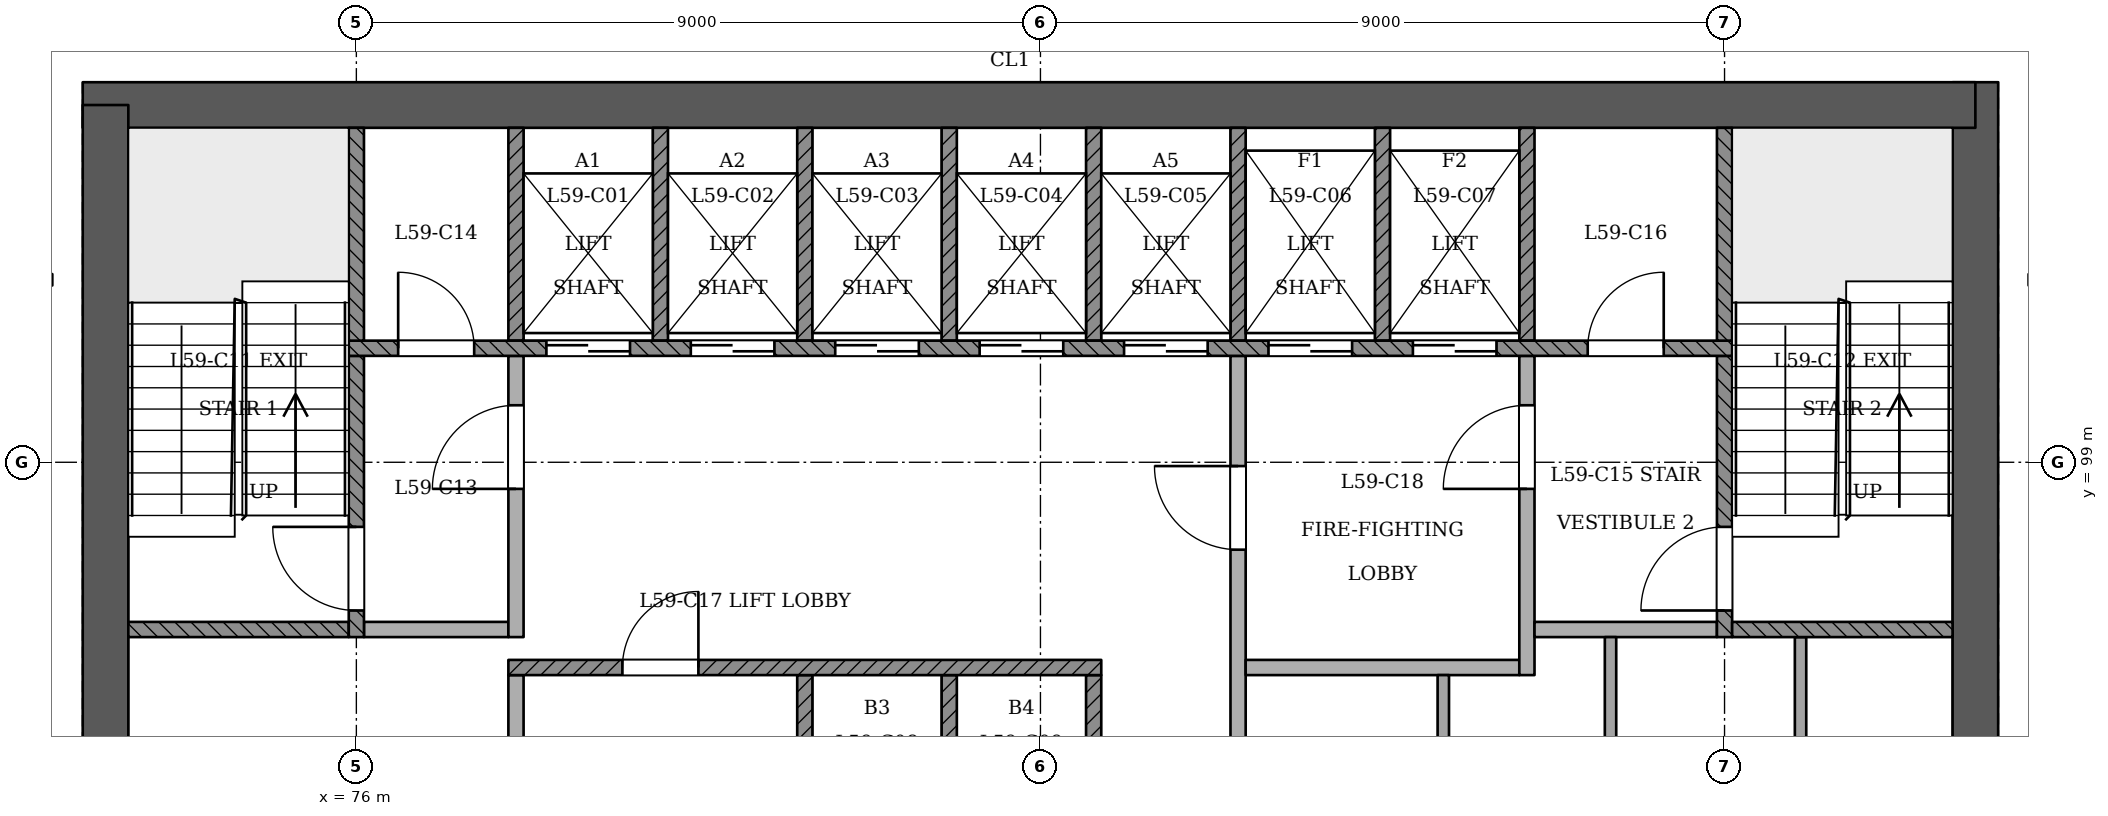
"""IFC4 building model, lengths in metres.
Left out: names, types, materials, properties, quantities, classifications, styles, units other than length and angle.
Written with IfcOpenShell. Run it as: python <this file> out.ifc"""

import sys

from ifc_helpers import new_model, si_unit, direction, frame, frame_2d, origin, place, context, subcontext, project, spatial, rectangle, extrude, element, fill, save


model = new_model("IFC4")
c1 = context("Model", 3, precision=1e-05, world=origin(), true_north=direction((0.0, 1.0)))
c2 = subcontext(c1, "Body", "Model", "MODEL_VIEW")
j1 = project(units=[si_unit("LENGTHUNIT", "METRE"), si_unit("PLANEANGLEUNIT", "RADIAN")], contexts=[c1])
p1 = place(None, origin())
s1 = spatial("IfcSite", under=j1, at=p1, CompositionType="ELEMENT")
p2 = place(p1, origin())
s2 = spatial("IfcBuilding", under=s1, at=p2, CompositionType="ELEMENT")
p3 = place(p2, frame((0.0, 0.0, 230.2)))
s3 = spatial("IfcBuildingStorey", under=s2, at=p3, CompositionType="ELEMENT", Elevation=230.2)
p4 = place(p3, frame((97.3, 93.1, 0.0), z_axis=(0.0, 0.0, 1.0), x_axis=(0.0, 1.0, 0.0)))
e1 = element("IfcWall", 1, at=p4, inside=s3, PredefinedType="SHEAR", context=c2, shape_type="SweptSolid", body=[
    extrude(rectangle(XDim=10.9, YDim=0.6, at=frame_2d((5.45, 0.0))), origin(), (0.0, 0.0, 1.0), 3.6),
])
p5 = place(p3, frame((97.3, 103.7, 0.0), z_axis=(0.0, 0.0, 1.0), x_axis=(-1.0, 0.0, 0.0)))
e2 = element("IfcWall", 2, at=p5, inside=s3, PredefinedType="SHEAR", context=c2, shape_type="SweptSolid", body=[
    extrude(rectangle(XDim=24.9, YDim=0.6, at=frame_2d((12.45, 0.0))), origin(), (0.0, 0.0, 1.0), 3.6),
])
p6 = place(p3, frame((72.7, 103.7, 0.0), z_axis=(0.0, 0.0, 1.0), x_axis=(0.0, -1.0, 0.0)))
e3 = element("IfcWall", 3, at=p6, inside=s3, PredefinedType="SHEAR", context=c2, shape_type="SweptSolid", body=[
    extrude(rectangle(XDim=10.9, YDim=0.6, at=frame_2d((5.45, 0.0))), origin(), (0.0, 0.0, 1.0), 3.6),
])
p7 = place(p3, frame((72.0, 101.401, 0.0), z_axis=(0.0, 0.0, 1.0), x_axis=(-1.0, 0.0, 0.0)))
e4 = element("IfcWall", 4, at=p7, inside=s3, PredefinedType="PARTITIONING", context=c2, shape_type="SweptSolid", body=[
    extrude(rectangle(XDim=1.8, YDim=0.15, at=frame_2d((0.9, 0.0))), origin(), (0.0, 0.0, 1.0), 3.2),
])
p8 = place(p3, frame((78.1, 93.4, 0.0), z_axis=(0.0, 0.0, 1.0), x_axis=(0.0, 1.0, 0.0)))
e5 = element("IfcWall", 5, at=p8, inside=s3, PredefinedType="PARTITIONING", context=c2, shape_type="SweptSolid", body=[
    extrude(rectangle(XDim=2.8, YDim=0.2, at=frame_2d((1.4, 0.0))), origin(), (0.0, 0.0, 1.0), 3.2),
])
for number, where, z_axis, x_axis in (
    (6, (81.9, 93.4, 0.0), (0.0, 0.0, 1.0), (0.0, 1.0, 0.0)),
    (7, (83.8, 93.4, 0.0), (0.0, 0.0, 1.0), (0.0, 1.0, 0.0)),
    (8, (85.7, 93.4, 0.0), (0.0, 0.0, 1.0), (0.0, 1.0, 0.0)),
):
    element("IfcWall", number, at=place(p3, frame(where, z_axis=z_axis, x_axis=x_axis)), inside=s3, PredefinedType="SOLIDWALL", context=c2, shape_type="SweptSolid", body=[
        extrude(rectangle(XDim=2.8, YDim=0.2, at=frame_2d((1.4, 0.0))), origin(), (0.0, 0.0, 1.0), 3.2),
    ])
p9 = place(p3, frame((87.6, 93.4, 0.0), z_axis=(0.0, 0.0, 1.0), x_axis=(0.0, 1.0, 0.0)))
e9 = element("IfcWall", 9, at=p9, inside=s3, PredefinedType="PARTITIONING", context=c2, shape_type="SweptSolid", body=[
    extrude(rectangle(XDim=7.0, YDim=0.2, at=frame_2d((3.5, 0.0))), origin(), (0.0, 0.0, 1.0), 3.2),
])
p10 = place(p9, frame((4.45, 0.0, 0.0)))
e10 = element("IfcOpeningElement", 10, at=p10, cuts=e9, PredefinedType="OPENING", context=c2, shape_type="SweptSolid", body=[
    extrude(rectangle(XDim=1.1, YDim=2.1, at=frame_2d((0.55, 1.05))), frame((0.0, 0.11, 0.0), z_axis=(0.0, -1.0, 0.0), x_axis=(1.0, 0.0, 0.0)), (0.0, 0.0, 1.0), 0.221),
])
p11 = place(p3, frame((90.3, 93.4, 0.0), z_axis=(0.0, 0.0, 1.0), x_axis=(0.0, 1.0, 0.0)))
e11 = element("IfcWall", 11, at=p11, inside=s3, PredefinedType="PARTITIONING", context=c2, shape_type="SweptSolid", body=[
    extrude(rectangle(XDim=2.8, YDim=0.15, at=frame_2d((1.4, 0.0))), origin(), (0.0, 0.0, 1.0), 3.2),
])
for number, where, z_axis, x_axis in (
    (12, (92.5, 93.4, 0.0), (0.0, 0.0, 1.0), (0.0, 1.0, 0.0)),
    (13, (95.0, 93.4, 0.0), (0.0, 0.0, 1.0), (0.0, 1.0, 0.0)),
):
    element("IfcWall", number, at=place(p3, frame(where, z_axis=z_axis, x_axis=x_axis)), inside=s3, PredefinedType="PARTITIONING", context=c2, shape_type="SweptSolid", body=[
        extrude(rectangle(XDim=3.3, YDim=0.15, at=frame_2d((1.65, 0.0))), origin(), (0.0, 0.0, 1.0), 3.2),
    ])
p12 = place(p3, frame((78.0, 96.3, 0.0), z_axis=(0.0, 0.0, 1.0), x_axis=(1.0, 0.0, 0.0)))
e14 = element("IfcWall", 14, at=p12, inside=s3, PredefinedType="SOLIDWALL", context=c2, shape_type="SweptSolid", body=[
    extrude(rectangle(XDim=7.8, YDim=0.2, at=frame_2d((3.9, 0.0))), origin(), (0.0, 0.0, 1.0), 3.2),
])
p13 = place(p12, frame((1.5, 0.0, 0.0)))
e15 = element("IfcOpeningElement", 15, at=p13, cuts=e14, PredefinedType="OPENING", context=c2, shape_type="SweptSolid", body=[
    extrude(rectangle(XDim=1.0, YDim=2.1, at=frame_2d((0.5, 1.05))), frame((0.0, 0.11, 0.0), z_axis=(0.0, -1.0, 0.0), x_axis=(1.0, 0.0, 0.0)), (0.0, 0.0, 1.0), 0.221),
])
p14 = place(p3, frame((87.7, 96.3, 0.0), z_axis=(0.0, 0.0, 1.0), x_axis=(1.0, 0.0, 0.0)))
e16 = element("IfcWall", 16, at=p14, inside=s3, PredefinedType="PARTITIONING", context=c2, shape_type="SweptSolid", body=[
    extrude(rectangle(XDim=3.6, YDim=0.2, at=frame_2d((1.8, 0.0))), origin(), (0.0, 0.0, 1.0), 3.2),
])
p15 = place(p3, frame((91.4, 96.2, 0.0), z_axis=(0.0, 0.0, 1.0), x_axis=(0.0, 1.0, 0.0)))
e17 = element("IfcWall", 17, at=p15, inside=s3, PredefinedType="PARTITIONING", context=c2, shape_type="SweptSolid", body=[
    extrude(rectangle(XDim=4.2, YDim=0.2, at=frame_2d((2.1, 0.0))), origin(), (0.0, 0.0, 1.0), 3.2),
])
p16 = place(p15, frame((2.45, 0.0, 0.0)))
e18 = element("IfcOpeningElement", 18, at=p16, cuts=e17, PredefinedType="OPENING", context=c2, shape_type="SweptSolid", body=[
    extrude(rectangle(XDim=1.1, YDim=2.1, at=frame_2d((0.55, 1.05))), frame((0.0, 0.11, 0.0), z_axis=(0.0, -1.0, 0.0), x_axis=(1.0, 0.0, 0.0)), (0.0, 0.0, 1.0), 0.221),
])
p17 = place(p3, frame((73.0, 96.8, 0.0), z_axis=(0.0, 0.0, 1.0), x_axis=(1.0, 0.0, 0.0)))
e19 = element("IfcWall", 19, at=p17, inside=s3, PredefinedType="SOLIDWALL", context=c2, shape_type="SweptSolid", body=[
    extrude(rectangle(XDim=2.9, YDim=0.2, at=frame_2d((1.45, 0.0))), origin(), (0.0, 0.0, 1.0), 3.2),
])
p18 = place(p3, frame((76.0, 96.7, 0.0), z_axis=(0.0, 0.0, 1.0), x_axis=(0.0, 1.0, 0.0)))
e20 = element("IfcWall", 20, at=p18, inside=s3, PredefinedType="SOLIDWALL", context=c2, shape_type="SweptSolid", body=[
    extrude(rectangle(XDim=3.7, YDim=0.2, at=frame_2d((1.85, 0.0))), origin(), (0.0, 0.0, 1.0), 3.2),
])
p19 = place(p18, frame((0.35, 0.0, 0.0)))
e21 = element("IfcOpeningElement", 21, at=p19, cuts=e20, PredefinedType="OPENING", context=c2, shape_type="SweptSolid", body=[
    extrude(rectangle(XDim=1.1, YDim=2.1, at=frame_2d((0.55, 1.05))), frame((0.0, 0.11, 0.0), z_axis=(0.0, -1.0, 0.0), x_axis=(1.0, 0.0, 0.0)), (0.0, 0.0, 1.0), 0.221),
])
p20 = place(p3, frame((76.1, 96.8, 0.0), z_axis=(0.0, 0.0, 1.0), x_axis=(1.0, 0.0, 0.0)))
e22 = element("IfcWall", 22, at=p20, inside=s3, PredefinedType="PARTITIONING", context=c2, shape_type="SweptSolid", body=[
    extrude(rectangle(XDim=1.9, YDim=0.2, at=frame_2d((0.95, 0.0))), origin(), (0.0, 0.0, 1.0), 3.2),
])
p21 = place(p3, frame((78.1, 96.7, 0.0), z_axis=(0.0, 0.0, 1.0), x_axis=(0.0, 1.0, 0.0)))
e23 = element("IfcWall", 23, at=p21, inside=s3, PredefinedType="PARTITIONING", context=c2, shape_type="SweptSolid", body=[
    extrude(rectangle(XDim=3.7, YDim=0.2, at=frame_2d((1.85, 0.0))), origin(), (0.0, 0.0, 1.0), 3.2),
])
p22 = place(p21, frame((1.95, 0.0, 0.0)))
e24 = element("IfcOpeningElement", 24, at=p22, cuts=e23, PredefinedType="OPENING", context=c2, shape_type="SweptSolid", body=[
    extrude(rectangle(XDim=1.1, YDim=2.1, at=frame_2d((0.55, 1.05))), frame((0.0, 0.11, 0.0), z_axis=(0.0, -1.0, 0.0), x_axis=(1.0, 0.0, 0.0)), (0.0, 0.0, 1.0), 0.221),
])
p23 = place(p3, frame((91.5, 96.8, 0.0), z_axis=(0.0, 0.0, 1.0), x_axis=(1.0, 0.0, 0.0)))
e25 = element("IfcWall", 25, at=p23, inside=s3, PredefinedType="PARTITIONING", context=c2, shape_type="SweptSolid", body=[
    extrude(rectangle(XDim=2.4, YDim=0.2, at=frame_2d((1.2, 0.0))), origin(), (0.0, 0.0, 1.0), 3.2),
])
p24 = place(p3, frame((94.0, 96.7, 0.0), z_axis=(0.0, 0.0, 1.0), x_axis=(0.0, 1.0, 0.0)))
e26 = element("IfcWall", 26, at=p24, inside=s3, PredefinedType="SOLIDWALL", context=c2, shape_type="SweptSolid", body=[
    extrude(rectangle(XDim=3.7, YDim=0.2, at=frame_2d((1.85, 0.0))), origin(), (0.0, 0.0, 1.0), 3.2),
])
p25 = place(p24, frame((0.35, 0.0, 0.0)))
e27 = element("IfcOpeningElement", 27, at=p25, cuts=e26, PredefinedType="OPENING", context=c2, shape_type="SweptSolid", body=[
    extrude(rectangle(XDim=1.1, YDim=2.1, at=frame_2d((0.55, 1.05))), frame((0.0, 0.11, 0.0), z_axis=(0.0, -1.0, 0.0), x_axis=(1.0, 0.0, 0.0)), (0.0, 0.0, 1.0), 0.221),
])
p26 = place(p3, frame((94.1, 96.8, 0.0), z_axis=(0.0, 0.0, 1.0), x_axis=(1.0, 0.0, 0.0)))
e28 = element("IfcWall", 28, at=p26, inside=s3, PredefinedType="SOLIDWALL", context=c2, shape_type="SweptSolid", body=[
    extrude(rectangle(XDim=2.9, YDim=0.2, at=frame_2d((1.45, 0.0))), origin(), (0.0, 0.0, 1.0), 3.2),
])
p27 = place(p3, frame((75.9, 100.5, 0.0), z_axis=(0.0, 0.0, 1.0), x_axis=(1.0, 0.0, 0.0)))
e29 = element("IfcWall", 29, at=p27, inside=s3, PredefinedType="SOLIDWALL", context=c2, shape_type="SweptSolid", body=[
    extrude(rectangle(XDim=18.2, YDim=0.2, at=frame_2d((9.1, 0.0))), origin(), (0.0, 0.0, 1.0), 3.2),
])
p28 = place(p27, frame((2.6, 0.0, 0.0)))
e30 = element("IfcOpeningElement", 30, at=p28, cuts=e29, PredefinedType="OPENING", context=c2, shape_type="SweptSolid", body=[
    extrude(rectangle(XDim=1.1, YDim=2.1, at=frame_2d((0.55, 1.05))), frame((0.0, 0.11, 0.0), z_axis=(0.0, -1.0, 0.0), x_axis=(1.0, 0.0, 0.0)), (0.0, 0.0, 1.0), 0.221),
])
p29 = place(p27, frame((4.5, 0.0, 0.0)))
e31 = element("IfcOpeningElement", 31, at=p29, cuts=e29, PredefinedType="OPENING", context=c2, shape_type="SweptSolid", body=[
    extrude(rectangle(XDim=1.1, YDim=2.1, at=frame_2d((0.55, 1.05))), frame((0.0, 0.11, 0.0), z_axis=(0.0, -1.0, 0.0), x_axis=(1.0, 0.0, 0.0)), (0.0, 0.0, 1.0), 0.221),
])
p30 = place(p27, frame((6.4, 0.0, 0.0)))
e32 = element("IfcOpeningElement", 32, at=p30, cuts=e29, PredefinedType="OPENING", context=c2, shape_type="SweptSolid", body=[
    extrude(rectangle(XDim=1.1, YDim=2.1, at=frame_2d((0.55, 1.05))), frame((0.0, 0.11, 0.0), z_axis=(0.0, -1.0, 0.0), x_axis=(1.0, 0.0, 0.0)), (0.0, 0.0, 1.0), 0.221),
])
p31 = place(p27, frame((8.3, 0.0, 0.0)))
e33 = element("IfcOpeningElement", 33, at=p31, cuts=e29, PredefinedType="OPENING", context=c2, shape_type="SweptSolid", body=[
    extrude(rectangle(XDim=1.1, YDim=2.1, at=frame_2d((0.55, 1.05))), frame((0.0, 0.11, 0.0), z_axis=(0.0, -1.0, 0.0), x_axis=(1.0, 0.0, 0.0)), (0.0, 0.0, 1.0), 0.221),
])
p32 = place(p27, frame((10.2, 0.0, 0.0)))
e34 = element("IfcOpeningElement", 34, at=p32, cuts=e29, PredefinedType="OPENING", context=c2, shape_type="SweptSolid", body=[
    extrude(rectangle(XDim=1.1, YDim=2.1, at=frame_2d((0.55, 1.05))), frame((0.0, 0.11, 0.0), z_axis=(0.0, -1.0, 0.0), x_axis=(1.0, 0.0, 0.0)), (0.0, 0.0, 1.0), 0.221),
])
p33 = place(p27, frame((12.1, 0.0, 0.0)))
e35 = element("IfcOpeningElement", 35, at=p33, cuts=e29, PredefinedType="OPENING", context=c2, shape_type="SweptSolid", body=[
    extrude(rectangle(XDim=1.1, YDim=2.1, at=frame_2d((0.55, 1.05))), frame((0.0, 0.11, 0.0), z_axis=(0.0, -1.0, 0.0), x_axis=(1.0, 0.0, 0.0)), (0.0, 0.0, 1.0), 0.221),
])
p34 = place(p27, frame((14.0, 0.0, 0.0)))
e36 = element("IfcOpeningElement", 36, at=p34, cuts=e29, PredefinedType="OPENING", context=c2, shape_type="SweptSolid", body=[
    extrude(rectangle(XDim=1.1, YDim=2.1, at=frame_2d((0.55, 1.05))), frame((0.0, 0.11, 0.0), z_axis=(0.0, -1.0, 0.0), x_axis=(1.0, 0.0, 0.0)), (0.0, 0.0, 1.0), 0.221),
])
p35 = place(p27, frame((0.65, 0.0, 0.0)))
e37 = element("IfcOpeningElement", 37, at=p35, cuts=e29, PredefinedType="OPENING", context=c2, shape_type="SweptSolid", body=[
    extrude(rectangle(XDim=1.0, YDim=2.1, at=frame_2d((0.5, 1.05))), frame((0.0, 0.11, 0.0), z_axis=(0.0, -1.0, 0.0), x_axis=(1.0, 0.0, 0.0)), (0.0, 0.0, 1.0), 0.221),
])
p36 = place(p27, frame((16.3, 0.0, 0.0)))
e38 = element("IfcOpeningElement", 38, at=p36, cuts=e29, PredefinedType="OPENING", context=c2, shape_type="SweptSolid", body=[
    extrude(rectangle(XDim=1.0, YDim=2.1, at=frame_2d((0.5, 1.05))), frame((0.0, 0.11, 0.0), z_axis=(0.0, -1.0, 0.0), x_axis=(1.0, 0.0, 0.0)), (0.0, 0.0, 1.0), 0.221),
])
for number, where, z_axis, x_axis in (
    (39, (76.0, 100.6, 0.0), (0.0, 0.0, 1.0), (0.0, 1.0, 0.0)),
    (40, (78.1, 100.6, 0.0), (0.0, 0.0, 1.0), (0.0, 1.0, 0.0)),
    (41, (80.0, 100.6, 0.0), (0.0, 0.0, 1.0), (0.0, 1.0, 0.0)),
    (42, (81.9, 100.6, 0.0), (0.0, 0.0, 1.0), (0.0, 1.0, 0.0)),
    (43, (83.8, 100.6, 0.0), (0.0, 0.0, 1.0), (0.0, 1.0, 0.0)),
    (44, (85.7, 100.6, 0.0), (0.0, 0.0, 1.0), (0.0, 1.0, 0.0)),
    (45, (87.6, 100.6, 0.0), (0.0, 0.0, 1.0), (0.0, 1.0, 0.0)),
    (46, (89.5, 100.6, 0.0), (0.0, 0.0, 1.0), (0.0, 1.0, 0.0)),
    (47, (91.4, 100.6, 0.0), (0.0, 0.0, 1.0), (0.0, 1.0, 0.0)),
    (48, (94.0, 100.6, 0.0), (0.0, 0.0, 1.0), (0.0, 1.0, 0.0)),
):
    element("IfcWall", number, at=place(p3, frame(where, z_axis=z_axis, x_axis=x_axis)), inside=s3, PredefinedType="SOLIDWALL", context=c2, shape_type="SweptSolid", body=[
        extrude(rectangle(XDim=2.8, YDim=0.2, at=frame_2d((1.4, 0.0))), origin(), (0.0, 0.0, 1.0), 3.2),
    ])
p37 = place(p28, origin())
e49 = element("IfcDoor", 49, at=p37, inside=s3, OperationType="SLIDING_TO_RIGHT", PredefinedType="NOTDEFINED", context=c2, shape_type="SweptSolid", body=[
    extrude(rectangle(XDim=1.1, YDim=2.1, at=frame_2d((0.55, 1.05))), frame((0.0, 0.025, 0.0), z_axis=(0.0, -1.0, 0.0), x_axis=(1.0, 0.0, 0.0)), (0.0, 0.0, 1.0), 0.05),
])
fill(e30, e49)
p38 = place(p29, origin())
e50 = element("IfcDoor", 50, at=p38, inside=s3, OperationType="SLIDING_TO_LEFT", PredefinedType="NOTDEFINED", context=c2, shape_type="SweptSolid", body=[
    extrude(rectangle(XDim=1.1, YDim=2.1, at=frame_2d((0.55, 1.05))), frame((0.0, 0.025, 0.0), z_axis=(0.0, -1.0, 0.0), x_axis=(1.0, 0.0, 0.0)), (0.0, 0.0, 1.0), 0.05),
])
fill(e31, e50)
p39 = place(p30, origin())
e51 = element("IfcDoor", 51, at=p39, inside=s3, OperationType="SLIDING_TO_RIGHT", PredefinedType="NOTDEFINED", context=c2, shape_type="SweptSolid", body=[
    extrude(rectangle(XDim=1.1, YDim=2.1, at=frame_2d((0.55, 1.05))), frame((0.0, 0.025, 0.0), z_axis=(0.0, -1.0, 0.0), x_axis=(1.0, 0.0, 0.0)), (0.0, 0.0, 1.0), 0.05),
])
fill(e32, e51)
p40 = place(p31, origin())
e52 = element("IfcDoor", 52, at=p40, inside=s3, OperationType="SLIDING_TO_LEFT", PredefinedType="NOTDEFINED", context=c2, shape_type="SweptSolid", body=[
    extrude(rectangle(XDim=1.1, YDim=2.1, at=frame_2d((0.55, 1.05))), frame((0.0, 0.025, 0.0), z_axis=(0.0, -1.0, 0.0), x_axis=(1.0, 0.0, 0.0)), (0.0, 0.0, 1.0), 0.05),
])
fill(e33, e52)
p41 = place(p32, origin())
e53 = element("IfcDoor", 53, at=p41, inside=s3, OperationType="SLIDING_TO_RIGHT", PredefinedType="NOTDEFINED", context=c2, shape_type="SweptSolid", body=[
    extrude(rectangle(XDim=1.1, YDim=2.1, at=frame_2d((0.55, 1.05))), frame((0.0, 0.025, 0.0), z_axis=(0.0, -1.0, 0.0), x_axis=(1.0, 0.0, 0.0)), (0.0, 0.0, 1.0), 0.05),
])
fill(e34, e53)
p42 = place(p33, origin())
e54 = element("IfcDoor", 54, at=p42, inside=s3, OperationType="SLIDING_TO_RIGHT", PredefinedType="NOTDEFINED", context=c2, shape_type="SweptSolid", body=[
    extrude(rectangle(XDim=1.1, YDim=2.1, at=frame_2d((0.55, 1.05))), frame((0.0, 0.025, 0.0), z_axis=(0.0, -1.0, 0.0), x_axis=(1.0, 0.0, 0.0)), (0.0, 0.0, 1.0), 0.05),
])
fill(e35, e54)
p43 = place(p34, origin())
e55 = element("IfcDoor", 55, at=p43, inside=s3, OperationType="SLIDING_TO_LEFT", PredefinedType="NOTDEFINED", context=c2, shape_type="SweptSolid", body=[
    extrude(rectangle(XDim=1.1, YDim=2.1, at=frame_2d((0.55, 1.05))), frame((0.0, 0.025, 0.0), z_axis=(0.0, -1.0, 0.0), x_axis=(1.0, 0.0, 0.0)), (0.0, 0.0, 1.0), 0.05),
])
fill(e36, e55)
p44 = place(p19, origin())
e56 = element("IfcDoor", 56, at=p44, inside=s3, OperationType="SINGLE_SWING_RIGHT", PredefinedType="NOTDEFINED", context=c2, shape_type="SweptSolid", body=[
    extrude(rectangle(XDim=1.1, YDim=2.1, at=frame_2d((0.55, 1.05))), frame((0.0, 0.025, 0.0), z_axis=(0.0, -1.0, 0.0), x_axis=(1.0, 0.0, 0.0)), (0.0, 0.0, 1.0), 0.05),
])
fill(e21, e56)
p45 = place(p25, origin())
e57 = element("IfcDoor", 57, at=p45, inside=s3, OperationType="SINGLE_SWING_LEFT", PredefinedType="NOTDEFINED", context=c2, shape_type="SweptSolid", body=[
    extrude(rectangle(XDim=1.1, YDim=2.1, at=frame_2d((0.55, 1.05))), frame((0.0, 0.025, 0.0), z_axis=(0.0, -1.0, 0.0), x_axis=(1.0, 0.0, 0.0)), (0.0, 0.0, 1.0), 0.05),
])
fill(e27, e57)
p46 = place(p22, origin())
e58 = element("IfcDoor", 58, at=p46, inside=s3, OperationType="SINGLE_SWING_LEFT", PredefinedType="NOTDEFINED", context=c2, shape_type="SweptSolid", body=[
    extrude(rectangle(XDim=1.1, YDim=2.1, at=frame_2d((0.55, 1.05))), frame((0.0, 0.025, 0.0), z_axis=(0.0, -1.0, 0.0), x_axis=(1.0, 0.0, 0.0)), (0.0, 0.0, 1.0), 0.05),
])
fill(e24, e58)
p47 = place(p10, origin())
e59 = element("IfcDoor", 59, at=p47, inside=s3, OperationType="SINGLE_SWING_RIGHT", PredefinedType="NOTDEFINED", context=c2, shape_type="SweptSolid", body=[
    extrude(rectangle(XDim=1.1, YDim=2.1, at=frame_2d((0.55, 1.05))), frame((0.0, 0.025, 0.0), z_axis=(0.0, -1.0, 0.0), x_axis=(1.0, 0.0, 0.0)), (0.0, 0.0, 1.0), 0.05),
])
fill(e10, e59)
p48 = place(p16, origin())
e60 = element("IfcDoor", 60, at=p48, inside=s3, OperationType="SINGLE_SWING_LEFT", PredefinedType="NOTDEFINED", context=c2, shape_type="SweptSolid", body=[
    extrude(rectangle(XDim=1.1, YDim=2.1, at=frame_2d((0.55, 1.05))), frame((0.0, 0.025, 0.0), z_axis=(0.0, -1.0, 0.0), x_axis=(1.0, 0.0, 0.0)), (0.0, 0.0, 1.0), 0.05),
])
fill(e18, e60)
p49 = place(p35, origin())
e61 = element("IfcDoor", 61, at=p49, inside=s3, OperationType="SINGLE_SWING_LEFT", PredefinedType="NOTDEFINED", context=c2, shape_type="SweptSolid", body=[
    extrude(rectangle(XDim=1.0, YDim=2.1, at=frame_2d((0.5, 1.05))), frame((0.0, 0.025, 0.0), z_axis=(0.0, -1.0, 0.0), x_axis=(1.0, 0.0, 0.0)), (0.0, 0.0, 1.0), 0.05),
])
fill(e37, e61)
p50 = place(p36, origin())
e62 = element("IfcDoor", 62, at=p50, inside=s3, OperationType="SINGLE_SWING_RIGHT", PredefinedType="NOTDEFINED", context=c2, shape_type="SweptSolid", body=[
    extrude(rectangle(XDim=1.0, YDim=2.1, at=frame_2d((0.5, 1.05))), frame((0.0, 0.025, 0.0), z_axis=(0.0, -1.0, 0.0), x_axis=(1.0, 0.0, 0.0)), (0.0, 0.0, 1.0), 0.05),
])
fill(e38, e62)
p51 = place(p13, origin())
e63 = element("IfcDoor", 63, at=p51, inside=s3, OperationType="SINGLE_SWING_RIGHT", PredefinedType="NOTDEFINED", context=c2, shape_type="SweptSolid", body=[
    extrude(rectangle(XDim=1.0, YDim=2.1, at=frame_2d((0.5, 1.05))), frame((0.0, 0.025, 0.0), z_axis=(0.0, -1.0, 0.0), x_axis=(1.0, 0.0, 0.0)), (0.0, 0.0, 1.0), 0.05),
])
fill(e15, e63)
save(model, sys.argv[1])
